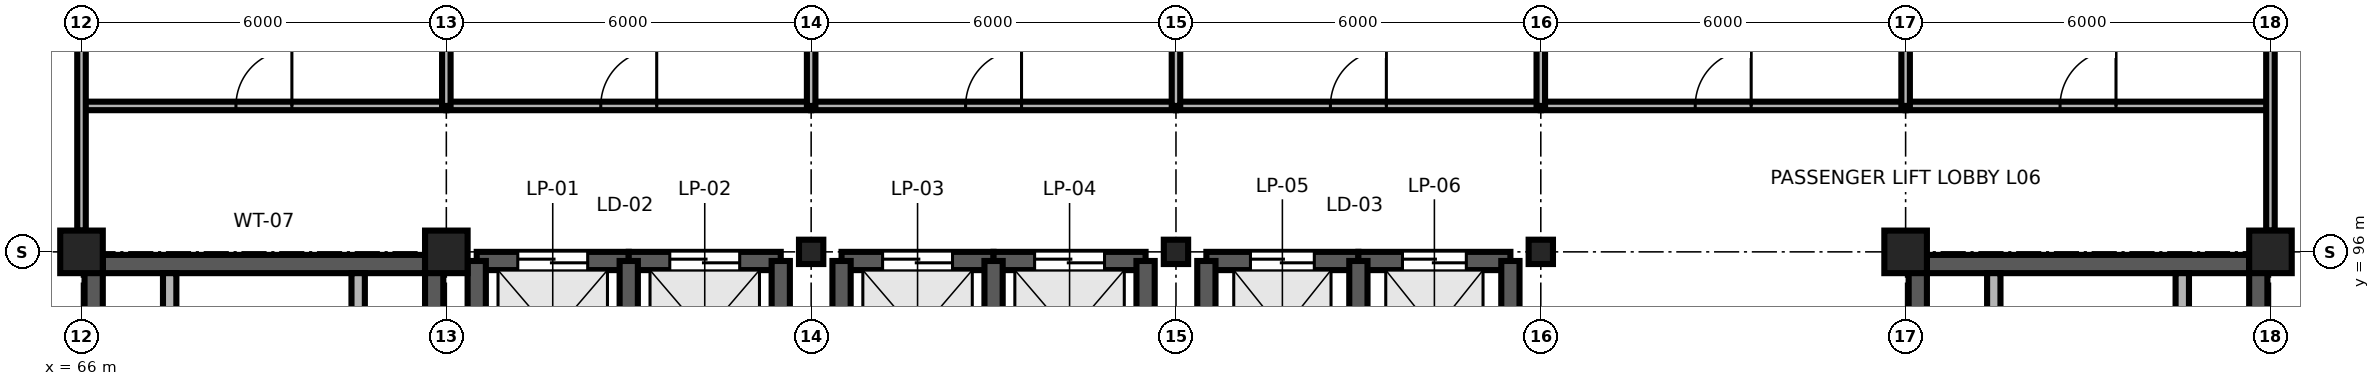
"""IFC4 building model, lengths in metres.
Left out: names, types, materials, properties, quantities, classifications, styles, units other than length and angle.
Written with IfcOpenShell. Run it as: python <this file> out.ifc"""

import sys

from ifc_helpers import new_model, si_unit, direction, frame, frame_2d, origin, origin_2d, place, context, subcontext, project, spatial, rectangle, i_section, extrude, element, fill, save


model = new_model("IFC4")
c1 = context("Model", 3, precision=1e-05, world=origin(), true_north=direction((0.0, 1.0)))
c2 = subcontext(c1, "Body", "Model", "MODEL_VIEW")
j1 = project(units=[si_unit("LENGTHUNIT", "METRE"), si_unit("PLANEANGLEUNIT", "RADIAN")], contexts=[c1])
p1 = place(None, origin())
s1 = spatial("IfcSite", under=j1, at=p1, CompositionType="ELEMENT")
p2 = place(p1, origin())
s2 = spatial("IfcBuilding", under=s1, at=p2, CompositionType="ELEMENT")
p3 = place(p2, frame((0.0, 0.0, 24.9)))
s3 = spatial("IfcBuildingStorey", under=s2, at=p3, CompositionType="ELEMENT", Elevation=24.9)
for number, where, z_axis, x_axis in (
    (1, (66.0, 96.0, 0.0), (0.0, 0.0, 1.0), (1.0, 0.0, 0.0)),
    (2, (72.0, 96.0, 0.0), (0.0, 0.0, 1.0), (1.0, 0.0, 0.0)),
):
    element("IfcColumn", number, at=place(p3, frame(where, z_axis=z_axis, x_axis=x_axis)), inside=s3, PredefinedType="COLUMN", context=c2, shape_type="SweptSolid", body=[
        extrude(rectangle(XDim=0.7, YDim=0.7, at=origin_2d()), origin(), (0.0, 0.0, 1.0), 3.9),
    ])
for number, where, z_axis, x_axis in (
    (3, (78.0, 96.0, 0.0), (0.0, 0.0, 1.0), (1.0, 0.0, 0.0)),
    (4, (84.0, 96.0, 0.0), (0.0, 0.0, 1.0), (1.0, 0.0, 0.0)),
    (5, (90.0, 96.0, 0.0), (0.0, 0.0, 1.0), (1.0, 0.0, 0.0)),
):
    element("IfcColumn", number, at=place(p3, frame(where, z_axis=z_axis, x_axis=x_axis)), inside=s3, PredefinedType="COLUMN", context=c2, shape_type="SweptSolid", body=[
        extrude(i_section(OverallWidth=0.4, OverallDepth=0.4, WebThickness=0.013, FlangeThickness=0.021, FilletRadius=0.022, at=origin_2d()), origin(), (0.0, 0.0, 1.0), 3.9),
    ])
for number, where, z_axis, x_axis in (
    (6, (96.0, 96.0, 0.0), (0.0, 0.0, 1.0), (1.0, 0.0, 0.0)),
    (7, (102.0, 96.0, 0.0), (0.0, 0.0, 1.0), (1.0, 0.0, 0.0)),
):
    element("IfcColumn", number, at=place(p3, frame(where, z_axis=z_axis, x_axis=x_axis)), inside=s3, PredefinedType="COLUMN", context=c2, shape_type="SweptSolid", body=[
        extrude(rectangle(XDim=0.7, YDim=0.7, at=origin_2d()), origin(), (0.0, 0.0, 1.0), 3.9),
    ])
p4 = place(p3, frame((66.35, 95.8, 0.0), z_axis=(0.0, 0.0, 1.0), x_axis=(1.0, 0.0, 0.0)))
e8 = element("IfcWall", 8, at=p4, inside=s3, PredefinedType="SHEAR", context=c2, shape_type="SweptSolid", body=[
    extrude(rectangle(XDim=5.3, YDim=0.3, at=frame_2d((2.65, 0.0))), origin(), (0.0, 0.0, 1.0), 3.74),
])
for number, where, z_axis, x_axis in (
    (9, (66.2, 84.0, 0.0), (0.0, 0.0, 1.0), (0.0, 1.0, 0.0)),
    (10, (71.8, 84.0, 0.0), (0.0, 0.0, 1.0), (0.0, 1.0, 0.0)),
):
    element("IfcWall", number, at=place(p3, frame(where, z_axis=z_axis, x_axis=x_axis)), inside=s3, PredefinedType="SHEAR", context=c2, shape_type="SweptSolid", body=[
        extrude(rectangle(XDim=11.8, YDim=0.3, at=frame_2d((5.9, 0.0))), origin(), (0.0, 0.0, 1.0), 3.74),
    ])
for number, where, z_axis, x_axis in (
    (11, (67.45, 94.4, 0.0), (0.0, 0.0, 1.0), (0.0, 1.0, 0.0)),
    (12, (70.55, 94.4, 0.0), (0.0, 0.0, 1.0), (0.0, 1.0, 0.0)),
):
    element("IfcWall", number, at=place(p3, frame(where, z_axis=z_axis, x_axis=x_axis)), inside=s3, PredefinedType="PARTITIONING", context=c2, shape_type="SweptSolid", body=[
        extrude(rectangle(XDim=1.25, YDim=0.22, at=frame_2d((0.625, 0.0))), origin(), (0.0, 0.0, 1.0), 3.74),
    ])
p5 = place(p3, frame((96.35, 95.8, 0.0), z_axis=(0.0, 0.0, 1.0), x_axis=(1.0, 0.0, 0.0)))
e13 = element("IfcWall", 13, at=p5, inside=s3, PredefinedType="SHEAR", context=c2, shape_type="SweptSolid", body=[
    extrude(rectangle(XDim=5.3, YDim=0.3, at=frame_2d((2.65, 0.0))), origin(), (0.0, 0.0, 1.0), 3.74),
])
for number, where, z_axis, x_axis in (
    (14, (96.2, 84.0, 0.0), (0.0, 0.0, 1.0), (0.0, 1.0, 0.0)),
    (15, (101.8, 84.0, 0.0), (0.0, 0.0, 1.0), (0.0, 1.0, 0.0)),
):
    element("IfcWall", number, at=place(p3, frame(where, z_axis=z_axis, x_axis=x_axis)), inside=s3, PredefinedType="SHEAR", context=c2, shape_type="SweptSolid", body=[
        extrude(rectangle(XDim=11.8, YDim=0.3, at=frame_2d((5.9, 0.0))), origin(), (0.0, 0.0, 1.0), 3.74),
    ])
for number, where, z_axis, x_axis in (
    (16, (97.45, 94.4, 0.0), (0.0, 0.0, 1.0), (0.0, 1.0, 0.0)),
    (17, (100.55, 94.4, 0.0), (0.0, 0.0, 1.0), (0.0, 1.0, 0.0)),
):
    element("IfcWall", number, at=place(p3, frame(where, z_axis=z_axis, x_axis=x_axis)), inside=s3, PredefinedType="PARTITIONING", context=c2, shape_type="SweptSolid", body=[
        extrude(rectangle(XDim=1.25, YDim=0.22, at=frame_2d((0.625, 0.0))), origin(), (0.0, 0.0, 1.0), 3.74),
    ])
p6 = place(p3, frame((72.5, 95.85, 0.0), z_axis=(0.0, 0.0, 1.0), x_axis=(1.0, 0.0, 0.0)))
e18 = element("IfcWall", 18, at=p6, inside=s3, PredefinedType="SHEAR", context=c2, shape_type="SweptSolid", body=[
    extrude(rectangle(XDim=2.5, YDim=0.3, at=frame_2d((1.25, 0.0))), origin(), (0.0, 0.0, 1.0), 3.74),
])
p7 = place(p6, frame((0.675, 0.0, 0.0)))
e19 = element("IfcOpeningElement", 19, at=p7, cuts=e18, PredefinedType="OPENING", context=c2, shape_type="SweptSolid", body=[
    extrude(rectangle(XDim=1.15, YDim=2.15, at=frame_2d((0.575, 1.075))), frame((0.0, 0.165, 0.0), z_axis=(0.0, -1.0, 0.0), x_axis=(1.0, 0.0, 0.0)), (0.0, 0.0, 1.0), 0.33),
])
p8 = place(p3, frame((72.5, 92.45, 0.0), z_axis=(0.0, 0.0, 1.0), x_axis=(0.0, 1.0, 0.0)))
e20 = element("IfcWall", 20, at=p8, inside=s3, PredefinedType="SHEAR", context=c2, shape_type="SweptSolid", body=[
    extrude(rectangle(XDim=3.4, YDim=0.3, at=frame_2d((1.7, 0.0))), origin(), (0.0, 0.0, 1.0), 3.74),
])
p9 = place(p3, frame((75.0, 95.85, 0.0), z_axis=(0.0, 0.0, 1.0), x_axis=(1.0, 0.0, 0.0)))
e21 = element("IfcWall", 21, at=p9, inside=s3, PredefinedType="SHEAR", context=c2, shape_type="SweptSolid", body=[
    extrude(rectangle(XDim=2.5, YDim=0.3, at=frame_2d((1.25, 0.0))), origin(), (0.0, 0.0, 1.0), 3.74),
])
p10 = place(p9, frame((0.675, 0.0, 0.0)))
e22 = element("IfcOpeningElement", 22, at=p10, cuts=e21, PredefinedType="OPENING", context=c2, shape_type="SweptSolid", body=[
    extrude(rectangle(XDim=1.15, YDim=2.15, at=frame_2d((0.575, 1.075))), frame((0.0, 0.165, 0.0), z_axis=(0.0, -1.0, 0.0), x_axis=(1.0, 0.0, 0.0)), (0.0, 0.0, 1.0), 0.33),
])
for number, where, z_axis, x_axis in (
    (23, (75.0, 92.45, 0.0), (0.0, 0.0, 1.0), (0.0, 1.0, 0.0)),
    (24, (77.5, 92.45, 0.0), (0.0, 0.0, 1.0), (0.0, 1.0, 0.0)),
):
    element("IfcWall", number, at=place(p3, frame(where, z_axis=z_axis, x_axis=x_axis)), inside=s3, PredefinedType="SHEAR", context=c2, shape_type="SweptSolid", body=[
        extrude(rectangle(XDim=3.4, YDim=0.3, at=frame_2d((1.7, 0.0))), origin(), (0.0, 0.0, 1.0), 3.74),
    ])
p11 = place(p3, frame((78.5, 95.85, 0.0), z_axis=(0.0, 0.0, 1.0), x_axis=(1.0, 0.0, 0.0)))
e25 = element("IfcWall", 25, at=p11, inside=s3, PredefinedType="SHEAR", context=c2, shape_type="SweptSolid", body=[
    extrude(rectangle(XDim=2.5, YDim=0.3, at=frame_2d((1.25, 0.0))), origin(), (0.0, 0.0, 1.0), 3.74),
])
p12 = place(p11, frame((0.675, 0.0, 0.0)))
e26 = element("IfcOpeningElement", 26, at=p12, cuts=e25, PredefinedType="OPENING", context=c2, shape_type="SweptSolid", body=[
    extrude(rectangle(XDim=1.15, YDim=2.15, at=frame_2d((0.575, 1.075))), frame((0.0, 0.165, 0.0), z_axis=(0.0, -1.0, 0.0), x_axis=(1.0, 0.0, 0.0)), (0.0, 0.0, 1.0), 0.33),
])
p13 = place(p3, frame((78.5, 92.45, 0.0), z_axis=(0.0, 0.0, 1.0), x_axis=(0.0, 1.0, 0.0)))
e27 = element("IfcWall", 27, at=p13, inside=s3, PredefinedType="SHEAR", context=c2, shape_type="SweptSolid", body=[
    extrude(rectangle(XDim=3.4, YDim=0.3, at=frame_2d((1.7, 0.0))), origin(), (0.0, 0.0, 1.0), 3.74),
])
p14 = place(p3, frame((81.0, 95.85, 0.0), z_axis=(0.0, 0.0, 1.0), x_axis=(1.0, 0.0, 0.0)))
e28 = element("IfcWall", 28, at=p14, inside=s3, PredefinedType="SHEAR", context=c2, shape_type="SweptSolid", body=[
    extrude(rectangle(XDim=2.5, YDim=0.3, at=frame_2d((1.25, 0.0))), origin(), (0.0, 0.0, 1.0), 3.74),
])
p15 = place(p14, frame((0.675, 0.0, 0.0)))
e29 = element("IfcOpeningElement", 29, at=p15, cuts=e28, PredefinedType="OPENING", context=c2, shape_type="SweptSolid", body=[
    extrude(rectangle(XDim=1.15, YDim=2.15, at=frame_2d((0.575, 1.075))), frame((0.0, 0.165, 0.0), z_axis=(0.0, -1.0, 0.0), x_axis=(1.0, 0.0, 0.0)), (0.0, 0.0, 1.0), 0.33),
])
for number, where, z_axis, x_axis in (
    (30, (81.0, 92.45, 0.0), (0.0, 0.0, 1.0), (0.0, 1.0, 0.0)),
    (31, (83.5, 92.45, 0.0), (0.0, 0.0, 1.0), (0.0, 1.0, 0.0)),
):
    element("IfcWall", number, at=place(p3, frame(where, z_axis=z_axis, x_axis=x_axis)), inside=s3, PredefinedType="SHEAR", context=c2, shape_type="SweptSolid", body=[
        extrude(rectangle(XDim=3.4, YDim=0.3, at=frame_2d((1.7, 0.0))), origin(), (0.0, 0.0, 1.0), 3.74),
    ])
p16 = place(p3, frame((84.5, 95.85, 0.0), z_axis=(0.0, 0.0, 1.0), x_axis=(1.0, 0.0, 0.0)))
e32 = element("IfcWall", 32, at=p16, inside=s3, PredefinedType="SHEAR", context=c2, shape_type="SweptSolid", body=[
    extrude(rectangle(XDim=2.5, YDim=0.3, at=frame_2d((1.25, 0.0))), origin(), (0.0, 0.0, 1.0), 3.74),
])
p17 = place(p16, frame((0.725, 0.0, 0.0)))
e33 = element("IfcOpeningElement", 33, at=p17, cuts=e32, PredefinedType="OPENING", context=c2, shape_type="SweptSolid", body=[
    extrude(rectangle(XDim=1.05, YDim=2.1, at=frame_2d((0.525, 1.05))), frame((0.0, 0.165, 0.0), z_axis=(0.0, -1.0, 0.0), x_axis=(1.0, 0.0, 0.0)), (0.0, 0.0, 1.0), 0.33),
])
p18 = place(p3, frame((84.5, 92.45, 0.0), z_axis=(0.0, 0.0, 1.0), x_axis=(0.0, 1.0, 0.0)))
e34 = element("IfcWall", 34, at=p18, inside=s3, PredefinedType="SHEAR", context=c2, shape_type="SweptSolid", body=[
    extrude(rectangle(XDim=3.4, YDim=0.3, at=frame_2d((1.7, 0.0))), origin(), (0.0, 0.0, 1.0), 3.74),
])
p19 = place(p3, frame((87.0, 95.85, 0.0), z_axis=(0.0, 0.0, 1.0), x_axis=(1.0, 0.0, 0.0)))
e35 = element("IfcWall", 35, at=p19, inside=s3, PredefinedType="SHEAR", context=c2, shape_type="SweptSolid", body=[
    extrude(rectangle(XDim=2.5, YDim=0.3, at=frame_2d((1.25, 0.0))), origin(), (0.0, 0.0, 1.0), 3.74),
])
p20 = place(p19, frame((0.725, 0.0, 0.0)))
e36 = element("IfcOpeningElement", 36, at=p20, cuts=e35, PredefinedType="OPENING", context=c2, shape_type="SweptSolid", body=[
    extrude(rectangle(XDim=1.05, YDim=2.1, at=frame_2d((0.525, 1.05))), frame((0.0, 0.165, 0.0), z_axis=(0.0, -1.0, 0.0), x_axis=(1.0, 0.0, 0.0)), (0.0, 0.0, 1.0), 0.33),
])
for number, where, z_axis, x_axis in (
    (37, (87.0, 92.45, 0.0), (0.0, 0.0, 1.0), (0.0, 1.0, 0.0)),
    (38, (89.5, 92.45, 0.0), (0.0, 0.0, 1.0), (0.0, 1.0, 0.0)),
):
    element("IfcWall", number, at=place(p3, frame(where, z_axis=z_axis, x_axis=x_axis)), inside=s3, PredefinedType="SHEAR", context=c2, shape_type="SweptSolid", body=[
        extrude(rectangle(XDim=3.4, YDim=0.3, at=frame_2d((1.7, 0.0))), origin(), (0.0, 0.0, 1.0), 3.74),
    ])
p21 = place(p3, frame((66.0, 98.4, 0.0), z_axis=(0.0, 0.0, 1.0), x_axis=(1.0, 0.0, 0.0)))
e39 = element("IfcWall", 39, at=p21, inside=s3, PredefinedType="PARTITIONING", context=c2, shape_type="SweptSolid", body=[
    extrude(rectangle(XDim=6.0, YDim=0.14, at=frame_2d((3.0, 0.0))), origin(), (0.0, 0.0, 1.0), 3.74),
])
p22 = place(p21, frame((2.54, 0.0, 0.0)))
e40 = element("IfcOpeningElement", 40, at=p22, cuts=e39, PredefinedType="OPENING", context=c2, shape_type="SweptSolid", body=[
    extrude(rectangle(XDim=0.92, YDim=2.15, at=frame_2d((0.46, 1.075))), frame((0.0, 0.085, 0.0), z_axis=(0.0, -1.0, 0.0), x_axis=(1.0, 0.0, 0.0)), (0.0, 0.0, 1.0), 0.17),
])
p23 = place(p3, frame((72.0, 98.4, 0.0), z_axis=(0.0, 0.0, 1.0), x_axis=(1.0, 0.0, 0.0)))
e41 = element("IfcWall", 41, at=p23, inside=s3, PredefinedType="PARTITIONING", context=c2, shape_type="SweptSolid", body=[
    extrude(rectangle(XDim=6.0, YDim=0.14, at=frame_2d((3.0, 0.0))), origin(), (0.0, 0.0, 1.0), 3.74),
])
p24 = place(p23, frame((2.54, 0.0, 0.0)))
e42 = element("IfcOpeningElement", 42, at=p24, cuts=e41, PredefinedType="OPENING", context=c2, shape_type="SweptSolid", body=[
    extrude(rectangle(XDim=0.92, YDim=2.15, at=frame_2d((0.46, 1.075))), frame((0.0, 0.085, 0.0), z_axis=(0.0, -1.0, 0.0), x_axis=(1.0, 0.0, 0.0)), (0.0, 0.0, 1.0), 0.17),
])
p25 = place(p3, frame((78.0, 98.4, 0.0), z_axis=(0.0, 0.0, 1.0), x_axis=(1.0, 0.0, 0.0)))
e43 = element("IfcWall", 43, at=p25, inside=s3, PredefinedType="PARTITIONING", context=c2, shape_type="SweptSolid", body=[
    extrude(rectangle(XDim=6.0, YDim=0.14, at=frame_2d((3.0, 0.0))), origin(), (0.0, 0.0, 1.0), 3.74),
])
p26 = place(p25, frame((2.54, 0.0, 0.0)))
e44 = element("IfcOpeningElement", 44, at=p26, cuts=e43, PredefinedType="OPENING", context=c2, shape_type="SweptSolid", body=[
    extrude(rectangle(XDim=0.92, YDim=2.15, at=frame_2d((0.46, 1.075))), frame((0.0, 0.085, 0.0), z_axis=(0.0, -1.0, 0.0), x_axis=(1.0, 0.0, 0.0)), (0.0, 0.0, 1.0), 0.17),
])
p27 = place(p3, frame((84.0, 98.4, 0.0), z_axis=(0.0, 0.0, 1.0), x_axis=(1.0, 0.0, 0.0)))
e45 = element("IfcWall", 45, at=p27, inside=s3, PredefinedType="PARTITIONING", context=c2, shape_type="SweptSolid", body=[
    extrude(rectangle(XDim=6.0, YDim=0.14, at=frame_2d((3.0, 0.0))), origin(), (0.0, 0.0, 1.0), 3.74),
])
p28 = place(p27, frame((2.54, 0.0, 0.0)))
e46 = element("IfcOpeningElement", 46, at=p28, cuts=e45, PredefinedType="OPENING", context=c2, shape_type="SweptSolid", body=[
    extrude(rectangle(XDim=0.92, YDim=2.15, at=frame_2d((0.46, 1.075))), frame((0.0, 0.085, 0.0), z_axis=(0.0, -1.0, 0.0), x_axis=(1.0, 0.0, 0.0)), (0.0, 0.0, 1.0), 0.17),
])
p29 = place(p3, frame((90.0, 98.4, 0.0), z_axis=(0.0, 0.0, 1.0), x_axis=(1.0, 0.0, 0.0)))
e47 = element("IfcWall", 47, at=p29, inside=s3, PredefinedType="PARTITIONING", context=c2, shape_type="SweptSolid", body=[
    extrude(rectangle(XDim=6.0, YDim=0.14, at=frame_2d((3.0, 0.0))), origin(), (0.0, 0.0, 1.0), 3.74),
])
p30 = place(p29, frame((2.54, 0.0, 0.0)))
e48 = element("IfcOpeningElement", 48, at=p30, cuts=e47, PredefinedType="OPENING", context=c2, shape_type="SweptSolid", body=[
    extrude(rectangle(XDim=0.92, YDim=2.15, at=frame_2d((0.46, 1.075))), frame((0.0, 0.085, 0.0), z_axis=(0.0, -1.0, 0.0), x_axis=(1.0, 0.0, 0.0)), (0.0, 0.0, 1.0), 0.17),
])
p31 = place(p3, frame((96.0, 98.4, 0.0), z_axis=(0.0, 0.0, 1.0), x_axis=(1.0, 0.0, 0.0)))
e49 = element("IfcWall", 49, at=p31, inside=s3, PredefinedType="PARTITIONING", context=c2, shape_type="SweptSolid", body=[
    extrude(rectangle(XDim=6.0, YDim=0.14, at=frame_2d((3.0, 0.0))), origin(), (0.0, 0.0, 1.0), 3.74),
])
p32 = place(p31, frame((2.54, 0.0, 0.0)))
e50 = element("IfcOpeningElement", 50, at=p32, cuts=e49, PredefinedType="OPENING", context=c2, shape_type="SweptSolid", body=[
    extrude(rectangle(XDim=0.92, YDim=2.15, at=frame_2d((0.46, 1.075))), frame((0.0, 0.085, 0.0), z_axis=(0.0, -1.0, 0.0), x_axis=(1.0, 0.0, 0.0)), (0.0, 0.0, 1.0), 0.17),
])
for number, where, z_axis, x_axis in (
    (51, (72.0, 98.4, 0.0), (0.0, 0.0, 1.0), (0.0, 1.0, 0.0)),
    (52, (78.0, 98.4, 0.0), (0.0, 0.0, 1.0), (0.0, 1.0, 0.0)),
    (53, (84.0, 98.4, 0.0), (0.0, 0.0, 1.0), (0.0, 1.0, 0.0)),
    (54, (90.0, 98.4, 0.0), (0.0, 0.0, 1.0), (0.0, 1.0, 0.0)),
    (55, (96.0, 98.4, 0.0), (0.0, 0.0, 1.0), (0.0, 1.0, 0.0)),
):
    element("IfcWall", number, at=place(p3, frame(where, z_axis=z_axis, x_axis=x_axis)), inside=s3, PredefinedType="PARTITIONING", context=c2, shape_type="SweptSolid", body=[
        extrude(rectangle(XDim=8.95, YDim=0.14, at=frame_2d((4.475, 0.0))), origin(), (0.0, 0.0, 1.0), 3.352),
    ])
for number, where, z_axis, x_axis in (
    (56, (66.0, 96.35, 0.0), (0.0, 0.0, 1.0), (0.0, 1.0, 0.0)),
    (57, (102.0, 96.35, 0.0), (0.0, 0.0, 1.0), (0.0, 1.0, 0.0)),
):
    element("IfcWall", number, at=place(p3, frame(where, z_axis=z_axis, x_axis=x_axis)), inside=s3, PredefinedType="PARTITIONING", context=c2, shape_type="SweptSolid", body=[
        extrude(rectangle(XDim=11.3, YDim=0.14, at=frame_2d((5.65, 0.0))), origin(), (0.0, 0.0, 1.0), 3.352),
    ])
p33 = place(p7, origin())
e58 = element("IfcDoor", 58, at=p33, inside=s3, OperationType="DOUBLE_DOOR_SLIDING", PredefinedType="DOOR", context=c2, shape_type="SweptSolid", body=[
    extrude(rectangle(XDim=1.15, YDim=2.15, at=frame_2d((0.575, 1.075))), frame((0.0, 0.025, 0.0), z_axis=(0.0, -1.0, 0.0), x_axis=(1.0, 0.0, 0.0)), (0.0, 0.0, 1.0), 0.05),
])
fill(e19, e58)
p34 = place(p10, origin())
e59 = element("IfcDoor", 59, at=p34, inside=s3, OperationType="DOUBLE_DOOR_SLIDING", PredefinedType="DOOR", context=c2, shape_type="SweptSolid", body=[
    extrude(rectangle(XDim=1.15, YDim=2.15, at=frame_2d((0.575, 1.075))), frame((0.0, 0.025, 0.0), z_axis=(0.0, -1.0, 0.0), x_axis=(1.0, 0.0, 0.0)), (0.0, 0.0, 1.0), 0.05),
])
fill(e22, e59)
p35 = place(p12, origin())
e60 = element("IfcDoor", 60, at=p35, inside=s3, OperationType="DOUBLE_DOOR_SLIDING", PredefinedType="DOOR", context=c2, shape_type="SweptSolid", body=[
    extrude(rectangle(XDim=1.15, YDim=2.15, at=frame_2d((0.575, 1.075))), frame((0.0, 0.025, 0.0), z_axis=(0.0, -1.0, 0.0), x_axis=(1.0, 0.0, 0.0)), (0.0, 0.0, 1.0), 0.05),
])
fill(e26, e60)
p36 = place(p15, origin())
e61 = element("IfcDoor", 61, at=p36, inside=s3, OperationType="DOUBLE_DOOR_SLIDING", PredefinedType="DOOR", context=c2, shape_type="SweptSolid", body=[
    extrude(rectangle(XDim=1.15, YDim=2.15, at=frame_2d((0.575, 1.075))), frame((0.0, 0.025, 0.0), z_axis=(0.0, -1.0, 0.0), x_axis=(1.0, 0.0, 0.0)), (0.0, 0.0, 1.0), 0.05),
])
fill(e29, e61)
p37 = place(p17, origin())
e62 = element("IfcDoor", 62, at=p37, inside=s3, OperationType="DOUBLE_DOOR_SLIDING", PredefinedType="DOOR", context=c2, shape_type="SweptSolid", body=[
    extrude(rectangle(XDim=1.05, YDim=2.1, at=frame_2d((0.525, 1.05))), frame((0.0, 0.025, 0.0), z_axis=(0.0, -1.0, 0.0), x_axis=(1.0, 0.0, 0.0)), (0.0, 0.0, 1.0), 0.05),
])
fill(e33, e62)
p38 = place(p20, origin())
e63 = element("IfcDoor", 63, at=p38, inside=s3, OperationType="DOUBLE_DOOR_SLIDING", PredefinedType="DOOR", context=c2, shape_type="SweptSolid", body=[
    extrude(rectangle(XDim=1.05, YDim=2.1, at=frame_2d((0.525, 1.05))), frame((0.0, 0.025, 0.0), z_axis=(0.0, -1.0, 0.0), x_axis=(1.0, 0.0, 0.0)), (0.0, 0.0, 1.0), 0.05),
])
fill(e36, e63)
p39 = place(p22, origin())
e64 = element("IfcDoor", 64, at=p39, inside=s3, OperationType="SINGLE_SWING_RIGHT", PredefinedType="DOOR", context=c2, shape_type="SweptSolid", body=[
    extrude(rectangle(XDim=0.92, YDim=2.15, at=frame_2d((0.46, 1.075))), frame((0.0, 0.025, 0.0), z_axis=(0.0, -1.0, 0.0), x_axis=(1.0, 0.0, 0.0)), (0.0, 0.0, 1.0), 0.05),
])
fill(e40, e64)
p40 = place(p24, origin())
e65 = element("IfcDoor", 65, at=p40, inside=s3, OperationType="SINGLE_SWING_RIGHT", PredefinedType="DOOR", context=c2, shape_type="SweptSolid", body=[
    extrude(rectangle(XDim=0.92, YDim=2.15, at=frame_2d((0.46, 1.075))), frame((0.0, 0.025, 0.0), z_axis=(0.0, -1.0, 0.0), x_axis=(1.0, 0.0, 0.0)), (0.0, 0.0, 1.0), 0.05),
])
fill(e42, e65)
p41 = place(p26, origin())
e66 = element("IfcDoor", 66, at=p41, inside=s3, OperationType="SINGLE_SWING_RIGHT", PredefinedType="DOOR", context=c2, shape_type="SweptSolid", body=[
    extrude(rectangle(XDim=0.92, YDim=2.15, at=frame_2d((0.46, 1.075))), frame((0.0, 0.025, 0.0), z_axis=(0.0, -1.0, 0.0), x_axis=(1.0, 0.0, 0.0)), (0.0, 0.0, 1.0), 0.05),
])
fill(e44, e66)
p42 = place(p28, origin())
e67 = element("IfcDoor", 67, at=p42, inside=s3, OperationType="SINGLE_SWING_RIGHT", PredefinedType="DOOR", context=c2, shape_type="SweptSolid", body=[
    extrude(rectangle(XDim=0.92, YDim=2.15, at=frame_2d((0.46, 1.075))), frame((0.0, 0.025, 0.0), z_axis=(0.0, -1.0, 0.0), x_axis=(1.0, 0.0, 0.0)), (0.0, 0.0, 1.0), 0.05),
])
fill(e46, e67)
p43 = place(p30, origin())
e68 = element("IfcDoor", 68, at=p43, inside=s3, OperationType="SINGLE_SWING_RIGHT", PredefinedType="DOOR", context=c2, shape_type="SweptSolid", body=[
    extrude(rectangle(XDim=0.92, YDim=2.15, at=frame_2d((0.46, 1.075))), frame((0.0, 0.025, 0.0), z_axis=(0.0, -1.0, 0.0), x_axis=(1.0, 0.0, 0.0)), (0.0, 0.0, 1.0), 0.05),
])
fill(e48, e68)
p44 = place(p32, origin())
e69 = element("IfcDoor", 69, at=p44, inside=s3, OperationType="SINGLE_SWING_RIGHT", PredefinedType="DOOR", context=c2, shape_type="SweptSolid", body=[
    extrude(rectangle(XDim=0.92, YDim=2.15, at=frame_2d((0.46, 1.075))), frame((0.0, 0.025, 0.0), z_axis=(0.0, -1.0, 0.0), x_axis=(1.0, 0.0, 0.0)), (0.0, 0.0, 1.0), 0.05),
])
fill(e50, e69)
save(model, sys.argv[1])
